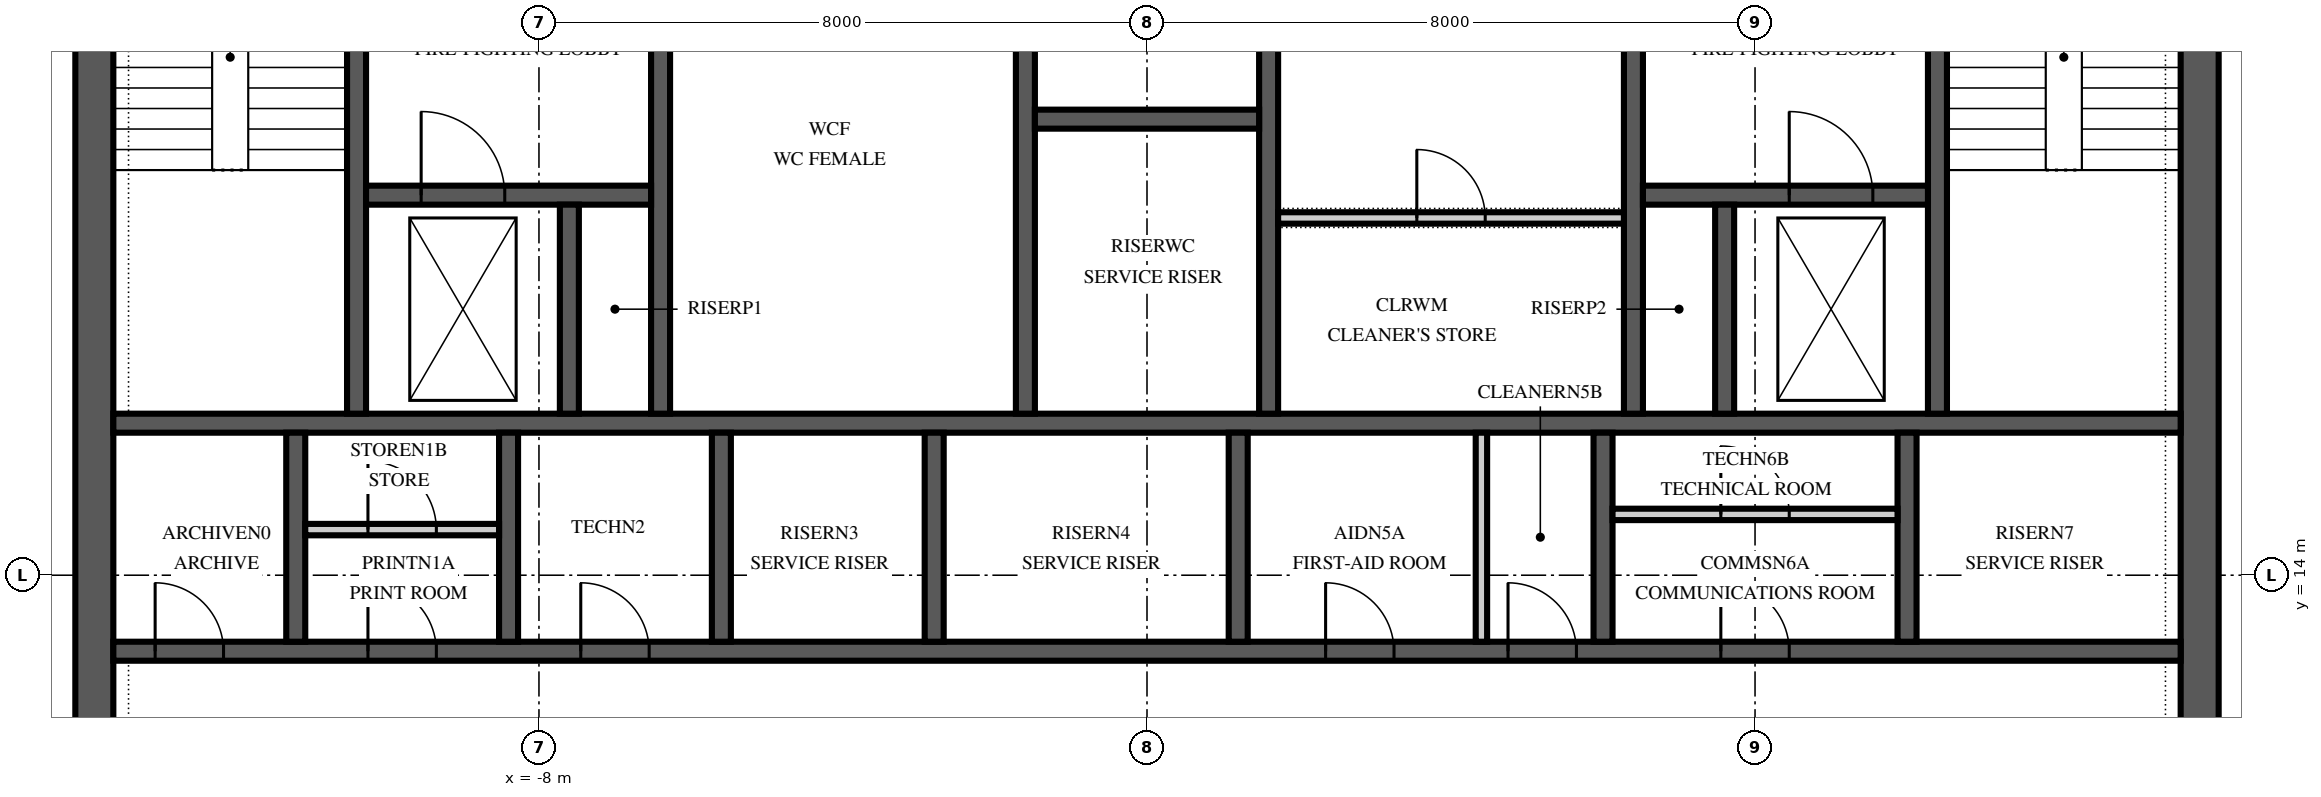
"""IFC4 building model, lengths in metres.
Left out: names, types, materials, properties, quantities, classifications, styles, units other than length and angle.
Written with IfcOpenShell. Run it as: python <this file> out.ifc"""

import sys

from ifc_helpers import new_model, si_unit, direction, frame, frame_2d, origin, place, context, subcontext, project, spatial, polyline, rectangle, outline, extrude, element, fill, save


model = new_model("IFC4")
c1 = context("Model", 3, precision=1e-05, world=origin(), true_north=direction((0.0, 1.0)))
c2 = subcontext(c1, "Body", "Model", "MODEL_VIEW")
j1 = project(units=[si_unit("LENGTHUNIT", "METRE"), si_unit("PLANEANGLEUNIT", "RADIAN")], contexts=[c1])
p1 = place(None, origin())
s1 = spatial("IfcSite", under=j1, at=p1, CompositionType="ELEMENT")
p2 = place(p1, origin())
s2 = spatial("IfcBuilding", under=s1, at=p2, CompositionType="ELEMENT")
p3 = place(p2, frame((0.0, 0.0, 312.0)))
s3 = spatial("IfcBuildingStorey", under=s2, at=p3, CompositionType="ELEMENT", Elevation=312.0)
p4 = place(p3, frame((13.85, 6.15, 0.0), z_axis=(0.0, 0.0, 1.0), x_axis=(0.0, 1.0, 0.0)))
e1 = element("IfcWall", 1, at=p4, inside=s3, PredefinedType="SHEAR", context=c2, shape_type="SweptSolid", body=[
    extrude(outline(polyline([(0.0, -0.25), (17.7, -0.25), (17.7, 0.0), (17.45, 0.0), (17.45, 0.25), (0.25, 0.25), (0.25, 0.0), (0.0, 0.0), (0.0, -0.25)])), origin(), (0.0, 0.0, 1.0), 4.0),
])
p5 = place(p4, frame((4.15, 0.0, 0.0)))
e2 = element("IfcOpeningElement", 2, at=p5, cuts=e1, PredefinedType="OPENING", context=c2, shape_type="SweptSolid", body=[
    extrude(rectangle(XDim=1.8, YDim=2.4, at=frame_2d((0.9, 1.2))), frame((0.0, 0.265, 0.0), z_axis=(0.0, -1.0, 0.0), x_axis=(1.0, 0.0, 0.0)), (0.0, 0.0, 1.0), 0.53),
])
p6 = place(p3, frame((-13.85, 23.85, 0.0), z_axis=(0.0, 0.0, 1.0), x_axis=(0.0, -1.0, 0.0)))
e3 = element("IfcWall", 3, at=p6, inside=s3, PredefinedType="SHEAR", context=c2, shape_type="SweptSolid", body=[
    extrude(outline(polyline([(0.0, -0.25), (17.7, -0.25), (17.7, 0.0), (17.45, 0.0), (17.45, 0.25), (0.25, 0.25), (0.25, 0.0), (0.0, 0.0), (0.0, -0.25)])), origin(), (0.0, 0.0, 1.0), 4.0),
])
p7 = place(p6, frame((11.75, 0.0, 0.0)))
e4 = element("IfcOpeningElement", 4, at=p7, cuts=e3, PredefinedType="OPENING", context=c2, shape_type="SweptSolid", body=[
    extrude(rectangle(XDim=1.8, YDim=2.4, at=frame_2d((0.9, 1.2))), frame((0.0, 0.265, 0.0), z_axis=(0.0, -1.0, 0.0), x_axis=(1.0, 0.0, 0.0)), (0.0, 0.0, 1.0), 0.53),
])
p8 = place(p3, frame((-13.6, 13.0, 0.0), z_axis=(0.0, 0.0, 1.0), x_axis=(1.0, 0.0, 0.0)))
e5 = element("IfcWall", 5, at=p8, inside=s3, PredefinedType="SHEAR", context=c2, shape_type="SweptSolid", body=[
    extrude(rectangle(XDim=27.2, YDim=0.25, at=frame_2d((13.6, 0.0))), origin(), (0.0, 0.0, 1.0), 4.0),
])
p9 = place(p8, frame((15.95, 0.0, 0.0)))
e6 = element("IfcOpeningElement", 6, at=p9, cuts=e5, PredefinedType="OPENING", context=c2, shape_type="SweptSolid", body=[
    extrude(rectangle(XDim=0.9, YDim=2.1, at=frame_2d((0.45, 1.05))), frame((0.0, 0.14, 0.0), z_axis=(0.0, -1.0, 0.0), x_axis=(1.0, 0.0, 0.0)), (0.0, 0.0, 1.0), 0.28),
])
p10 = place(p8, frame((18.35, 0.0, 0.0)))
e7 = element("IfcOpeningElement", 7, at=p10, cuts=e5, PredefinedType="OPENING", context=c2, shape_type="SweptSolid", body=[
    extrude(rectangle(XDim=0.9, YDim=2.1, at=frame_2d((0.45, 1.05))), frame((0.0, 0.14, 0.0), z_axis=(0.0, -1.0, 0.0), x_axis=(1.0, 0.0, 0.0)), (0.0, 0.0, 1.0), 0.28),
])
p11 = place(p8, frame((21.15, 0.0, 0.0)))
e8 = element("IfcOpeningElement", 8, at=p11, cuts=e5, PredefinedType="OPENING", context=c2, shape_type="SweptSolid", body=[
    extrude(rectangle(XDim=0.9, YDim=2.1, at=frame_2d((0.45, 1.05))), frame((0.0, 0.14, 0.0), z_axis=(0.0, -1.0, 0.0), x_axis=(1.0, 0.0, 0.0)), (0.0, 0.0, 1.0), 0.28),
])
p12 = place(p8, frame((0.55, 0.0, 0.0)))
e9 = element("IfcOpeningElement", 9, at=p12, cuts=e5, PredefinedType="OPENING", context=c2, shape_type="SweptSolid", body=[
    extrude(rectangle(XDim=0.9, YDim=2.1, at=frame_2d((0.45, 1.05))), frame((0.0, 0.14, 0.0), z_axis=(0.0, -1.0, 0.0), x_axis=(1.0, 0.0, 0.0)), (0.0, 0.0, 1.0), 0.28),
])
p13 = place(p8, frame((3.35, 0.0, 0.0)))
e10 = element("IfcOpeningElement", 10, at=p13, cuts=e5, PredefinedType="OPENING", context=c2, shape_type="SweptSolid", body=[
    extrude(rectangle(XDim=0.9, YDim=2.1, at=frame_2d((0.45, 1.05))), frame((0.0, 0.14, 0.0), z_axis=(0.0, -1.0, 0.0), x_axis=(1.0, 0.0, 0.0)), (0.0, 0.0, 1.0), 0.28),
])
p14 = place(p8, frame((6.15, 0.0, 0.0)))
e11 = element("IfcOpeningElement", 11, at=p14, cuts=e5, PredefinedType="OPENING", context=c2, shape_type="SweptSolid", body=[
    extrude(rectangle(XDim=0.9, YDim=2.1, at=frame_2d((0.45, 1.05))), frame((0.0, 0.14, 0.0), z_axis=(0.0, -1.0, 0.0), x_axis=(1.0, 0.0, 0.0)), (0.0, 0.0, 1.0), 0.28),
])
p15 = place(p3, frame((-13.6, 16.0, 0.0), z_axis=(0.0, 0.0, 1.0), x_axis=(1.0, 0.0, 0.0)))
e12 = element("IfcWall", 12, at=p15, inside=s3, PredefinedType="SHEAR", context=c2, shape_type="SweptSolid", body=[
    extrude(rectangle(XDim=27.2, YDim=0.25, at=frame_2d((13.6, 0.0))), origin(), (0.0, 0.0, 1.0), 4.0),
])
for number, where, z_axis, x_axis in (
    (13, (-11.2, 13.125, 0.0), (0.0, 0.0, 1.0), (0.0, 1.0, 0.0)),
    (14, (-8.4, 13.125, 0.0), (0.0, 0.0, 1.0), (0.0, 1.0, 0.0)),
    (15, (-5.6, 13.125, 0.0), (0.0, 0.0, 1.0), (0.0, 1.0, 0.0)),
    (16, (-2.8, 13.125, 0.0), (0.0, 0.0, 1.0), (0.0, 1.0, 0.0)),
    (17, (1.2, 13.125, 0.0), (0.0, 0.0, 1.0), (0.0, 1.0, 0.0)),
    (18, (6.0, 13.125, 0.0), (0.0, 0.0, 1.0), (0.0, 1.0, 0.0)),
    (19, (10.0, 13.125, 0.0), (0.0, 0.0, 1.0), (0.0, 1.0, 0.0)),
):
    element("IfcWall", number, at=place(p3, frame(where, z_axis=z_axis, x_axis=x_axis)), inside=s3, PredefinedType="SHEAR", context=c2, shape_type="SweptSolid", body=[
        extrude(rectangle(XDim=2.75, YDim=0.25, at=frame_2d((1.375, 0.0))), origin(), (0.0, 0.0, 1.0), 4.0),
    ])
p16 = place(p3, frame((-10.4, 16.125, 0.0), z_axis=(0.0, 0.0, 1.0), x_axis=(0.0, 1.0, 0.0)))
e20 = element("IfcWall", 20, at=p16, inside=s3, PredefinedType="SHEAR", context=c2, shape_type="SweptSolid", body=[
    extrude(rectangle(XDim=7.475, YDim=0.25, at=frame_2d((3.738, 0.0))), origin(), (0.0, 0.0, 1.0), 4.0),
])
p17 = place(p16, frame((6.275, 0.0, 0.0)))
e21 = element("IfcOpeningElement", 21, at=p17, cuts=e20, PredefinedType="OPENING", context=c2, shape_type="SweptSolid", body=[
    extrude(rectangle(XDim=1.0, YDim=2.1, at=frame_2d((0.5, 1.05))), frame((0.0, 0.14, 0.0), z_axis=(0.0, -1.0, 0.0), x_axis=(1.0, 0.0, 0.0)), (0.0, 0.0, 1.0), 0.28),
])
for number, where, z_axis, x_axis in (
    (22, (-6.4, 16.125, 0.0), (0.0, 0.0, 1.0), (0.0, 1.0, 0.0)),
    (23, (-1.6, 16.125, 0.0), (0.0, 0.0, 1.0), (0.0, 1.0, 0.0)),
    (24, (1.6, 16.125, 0.0), (0.0, 0.0, 1.0), (0.0, 1.0, 0.0)),
    (25, (6.4, 16.125, 0.0), (0.0, 0.0, 1.0), (0.0, 1.0, 0.0)),
):
    element("IfcWall", number, at=place(p3, frame(where, z_axis=z_axis, x_axis=x_axis)), inside=s3, PredefinedType="SHEAR", context=c2, shape_type="SweptSolid", body=[
        extrude(rectangle(XDim=7.475, YDim=0.25, at=frame_2d((3.738, 0.0))), origin(), (0.0, 0.0, 1.0), 4.0),
    ])
p18 = place(p3, frame((10.4, 16.125, 0.0), z_axis=(0.0, 0.0, 1.0), x_axis=(0.0, 1.0, 0.0)))
e26 = element("IfcWall", 26, at=p18, inside=s3, PredefinedType="SHEAR", context=c2, shape_type="SweptSolid", body=[
    extrude(rectangle(XDim=7.475, YDim=0.25, at=frame_2d((3.738, 0.0))), origin(), (0.0, 0.0, 1.0), 4.0),
])
p19 = place(p18, frame((6.275, 0.0, 0.0)))
e27 = element("IfcOpeningElement", 27, at=p19, cuts=e26, PredefinedType="OPENING", context=c2, shape_type="SweptSolid", body=[
    extrude(rectangle(XDim=1.0, YDim=2.1, at=frame_2d((0.5, 1.05))), frame((0.0, 0.14, 0.0), z_axis=(0.0, -1.0, 0.0), x_axis=(1.0, 0.0, 0.0)), (0.0, 0.0, 1.0), 0.28),
])
p20 = place(p3, frame((-10.275, 19.0, 0.0), z_axis=(0.0, 0.0, 1.0), x_axis=(1.0, 0.0, 0.0)))
e28 = element("IfcWall", 28, at=p20, inside=s3, PredefinedType="SHEAR", context=c2, shape_type="SweptSolid", body=[
    extrude(rectangle(XDim=3.75, YDim=0.25, at=frame_2d((1.875, 0.0))), origin(), (0.0, 0.0, 1.0), 4.0),
])
p21 = place(p20, frame((0.725, 0.0, 0.0)))
e29 = element("IfcOpeningElement", 29, at=p21, cuts=e28, PredefinedType="OPENING", context=c2, shape_type="SweptSolid", body=[
    extrude(rectangle(XDim=1.1, YDim=2.1, at=frame_2d((0.55, 1.05))), frame((0.0, 0.14, 0.0), z_axis=(0.0, -1.0, 0.0), x_axis=(1.0, 0.0, 0.0)), (0.0, 0.0, 1.0), 0.28),
])
p22 = place(p3, frame((6.525, 19.0, 0.0), z_axis=(0.0, 0.0, 1.0), x_axis=(1.0, 0.0, 0.0)))
e30 = element("IfcWall", 30, at=p22, inside=s3, PredefinedType="SHEAR", context=c2, shape_type="SweptSolid", body=[
    extrude(rectangle(XDim=3.75, YDim=0.25, at=frame_2d((1.875, 0.0))), origin(), (0.0, 0.0, 1.0), 4.0),
])
p23 = place(p22, frame((1.925, 0.0, 0.0)))
e31 = element("IfcOpeningElement", 31, at=p23, cuts=e30, PredefinedType="OPENING", context=c2, shape_type="SweptSolid", body=[
    extrude(rectangle(XDim=1.1, YDim=2.1, at=frame_2d((0.55, 1.05))), frame((0.0, 0.14, 0.0), z_axis=(0.0, -1.0, 0.0), x_axis=(1.0, 0.0, 0.0)), (0.0, 0.0, 1.0), 0.28),
])
for number, where, z_axis, x_axis in (
    (32, (-7.6, 16.125, 0.0), (0.0, 0.0, 1.0), (0.0, 1.0, 0.0)),
    (33, (7.6, 16.125, 0.0), (0.0, 0.0, 1.0), (0.0, 1.0, 0.0)),
):
    element("IfcWall", number, at=place(p3, frame(where, z_axis=z_axis, x_axis=x_axis)), inside=s3, PredefinedType="SHEAR", context=c2, shape_type="SweptSolid", body=[
        extrude(rectangle(XDim=2.75, YDim=0.25, at=frame_2d((1.375, 0.0))), origin(), (0.0, 0.0, 1.0), 4.0),
    ])
p24 = place(p3, frame((-1.475, 20.0, 0.0), z_axis=(0.0, 0.0, 1.0), x_axis=(1.0, 0.0, 0.0)))
e34 = element("IfcWall", 34, at=p24, inside=s3, PredefinedType="SHEAR", context=c2, shape_type="SweptSolid", body=[
    extrude(rectangle(XDim=2.95, YDim=0.25, at=frame_2d((1.475, 0.0))), origin(), (0.0, 0.0, 1.0), 4.0),
])
p25 = place(p3, frame((1.725, 18.7, 0.0), z_axis=(0.0, 0.0, 1.0), x_axis=(1.0, 0.0, 0.0)))
e35 = element("IfcWall", 35, at=p25, inside=s3, PredefinedType="PARTITIONING", context=c2, shape_type="SweptSolid", body=[
    extrude(rectangle(XDim=4.55, YDim=0.15, at=frame_2d((2.275, 0.0))), origin(), (0.0, 0.0, 1.0), 3.85),
])
p26 = place(p25, frame((1.825, 0.0, 0.0)))
e36 = element("IfcOpeningElement", 36, at=p26, cuts=e35, PredefinedType="OPENING", context=c2, shape_type="SweptSolid", body=[
    extrude(rectangle(XDim=0.9, YDim=2.1, at=frame_2d((0.45, 1.05))), frame((0.0, 0.09, 0.0), z_axis=(0.0, -1.0, 0.0), x_axis=(1.0, 0.0, 0.0)), (0.0, 0.0, 1.0), 0.18),
])
p27 = place(p3, frame((4.4, 13.125, 0.0), z_axis=(0.0, 0.0, 1.0), x_axis=(0.0, 1.0, 0.0)))
e37 = element("IfcWall", 37, at=p27, inside=s3, PredefinedType="PARTITIONING", context=c2, shape_type="SweptSolid", body=[
    extrude(rectangle(XDim=2.75, YDim=0.15, at=frame_2d((1.375, 0.0))), origin(), (0.0, 0.0, 1.0), 3.85),
])
p28 = place(p3, frame((6.125, 14.8, 0.0), z_axis=(0.0, 0.0, 1.0), x_axis=(1.0, 0.0, 0.0)))
e38 = element("IfcWall", 38, at=p28, inside=s3, PredefinedType="PARTITIONING", context=c2, shape_type="SweptSolid", body=[
    extrude(rectangle(XDim=3.75, YDim=0.15, at=frame_2d((1.875, 0.0))), origin(), (0.0, 0.0, 1.0), 3.85),
])
p29 = place(p28, frame((1.425, 0.0, 0.0)))
e39 = element("IfcOpeningElement", 39, at=p29, cuts=e38, PredefinedType="OPENING", context=c2, shape_type="SweptSolid", body=[
    extrude(rectangle(XDim=0.9, YDim=2.1, at=frame_2d((0.45, 1.05))), frame((0.0, 0.09, 0.0), z_axis=(0.0, -1.0, 0.0), x_axis=(1.0, 0.0, 0.0)), (0.0, 0.0, 1.0), 0.18),
])
p30 = place(p3, frame((-11.075, 14.6, 0.0), z_axis=(0.0, 0.0, 1.0), x_axis=(1.0, 0.0, 0.0)))
e40 = element("IfcWall", 40, at=p30, inside=s3, PredefinedType="PARTITIONING", context=c2, shape_type="SweptSolid", body=[
    extrude(rectangle(XDim=2.55, YDim=0.15, at=frame_2d((1.275, 0.0))), origin(), (0.0, 0.0, 1.0), 3.85),
])
p31 = place(p30, frame((0.825, 0.0, 0.0)))
e41 = element("IfcOpeningElement", 41, at=p31, cuts=e40, PredefinedType="OPENING", context=c2, shape_type="SweptSolid", body=[
    extrude(rectangle(XDim=0.9, YDim=2.1, at=frame_2d((0.45, 1.05))), frame((0.0, 0.09, 0.0), z_axis=(0.0, -1.0, 0.0), x_axis=(1.0, 0.0, 0.0)), (0.0, 0.0, 1.0), 0.18),
])
p32 = place(p23, origin())
e42 = element("IfcDoor", 42, at=p32, inside=s3, OperationType="SLIDING_TO_RIGHT", PredefinedType="DOOR", context=c2, shape_type="SweptSolid", body=[
    extrude(rectangle(XDim=1.1, YDim=2.1, at=frame_2d((0.55, 1.05))), frame((0.0, 0.125, 0.0), z_axis=(0.0, -1.0, 0.0), x_axis=(1.0, 0.0, 0.0)), (0.0, 0.0, 1.0), 0.25),
])
fill(e31, e42)
p33 = place(p21, origin())
e43 = element("IfcDoor", 43, at=p33, inside=s3, OperationType="SLIDING_TO_RIGHT", PredefinedType="DOOR", context=c2, shape_type="SweptSolid", body=[
    extrude(rectangle(XDim=1.1, YDim=2.1, at=frame_2d((0.55, 1.05))), frame((0.0, 0.125, 0.0), z_axis=(0.0, -1.0, 0.0), x_axis=(1.0, 0.0, 0.0)), (0.0, 0.0, 1.0), 0.25),
])
fill(e29, e43)
p34 = place(p9, origin())
e44 = element("IfcDoor", 44, at=p34, inside=s3, OperationType="SINGLE_SWING_LEFT", PredefinedType="DOOR", context=c2, shape_type="SweptSolid", body=[
    extrude(rectangle(XDim=0.9, YDim=2.1, at=frame_2d((0.45, 1.05))), frame((0.0, 0.125, 0.0), z_axis=(0.0, -1.0, 0.0), x_axis=(1.0, 0.0, 0.0)), (0.0, 0.0, 1.0), 0.25),
])
fill(e6, e44)
p35 = place(p10, origin())
e45 = element("IfcDoor", 45, at=p35, inside=s3, OperationType="SINGLE_SWING_LEFT", PredefinedType="DOOR", context=c2, shape_type="SweptSolid", body=[
    extrude(rectangle(XDim=0.9, YDim=2.1, at=frame_2d((0.45, 1.05))), frame((0.0, 0.125, 0.0), z_axis=(0.0, -1.0, 0.0), x_axis=(1.0, 0.0, 0.0)), (0.0, 0.0, 1.0), 0.25),
])
fill(e7, e45)
p36 = place(p11, origin())
e46 = element("IfcDoor", 46, at=p36, inside=s3, OperationType="SINGLE_SWING_LEFT", PredefinedType="DOOR", context=c2, shape_type="SweptSolid", body=[
    extrude(rectangle(XDim=0.9, YDim=2.1, at=frame_2d((0.45, 1.05))), frame((0.0, 0.125, 0.0), z_axis=(0.0, -1.0, 0.0), x_axis=(1.0, 0.0, 0.0)), (0.0, 0.0, 1.0), 0.25),
])
fill(e8, e46)
p37 = place(p29, origin())
e47 = element("IfcDoor", 47, at=p37, inside=s3, OperationType="SINGLE_SWING_LEFT", PredefinedType="DOOR", context=c2, shape_type="SweptSolid", body=[
    extrude(rectangle(XDim=0.9, YDim=2.1, at=frame_2d((0.45, 1.05))), frame((0.0, 0.075, 0.0), z_axis=(0.0, -1.0, 0.0), x_axis=(1.0, 0.0, 0.0)), (0.0, 0.0, 1.0), 0.149),
])
fill(e39, e47)
p38 = place(p12, origin())
e48 = element("IfcDoor", 48, at=p38, inside=s3, OperationType="SINGLE_SWING_LEFT", PredefinedType="DOOR", context=c2, shape_type="SweptSolid", body=[
    extrude(rectangle(XDim=0.9, YDim=2.1, at=frame_2d((0.45, 1.05))), frame((0.0, 0.125, 0.0), z_axis=(0.0, -1.0, 0.0), x_axis=(1.0, 0.0, 0.0)), (0.0, 0.0, 1.0), 0.25),
])
fill(e9, e48)
p39 = place(p13, origin())
e49 = element("IfcDoor", 49, at=p39, inside=s3, OperationType="SINGLE_SWING_LEFT", PredefinedType="DOOR", context=c2, shape_type="SweptSolid", body=[
    extrude(rectangle(XDim=0.9, YDim=2.1, at=frame_2d((0.45, 1.05))), frame((0.0, 0.125, 0.0), z_axis=(0.0, -1.0, 0.0), x_axis=(1.0, 0.0, 0.0)), (0.0, 0.0, 1.0), 0.25),
])
fill(e10, e49)
p40 = place(p31, origin())
e50 = element("IfcDoor", 50, at=p40, inside=s3, OperationType="SINGLE_SWING_LEFT", PredefinedType="DOOR", context=c2, shape_type="SweptSolid", body=[
    extrude(rectangle(XDim=0.9, YDim=2.1, at=frame_2d((0.45, 1.05))), frame((0.0, 0.075, 0.0), z_axis=(0.0, -1.0, 0.0), x_axis=(1.0, 0.0, 0.0)), (0.0, 0.0, 1.0), 0.149),
])
fill(e41, e50)
p41 = place(p14, origin())
e51 = element("IfcDoor", 51, at=p41, inside=s3, OperationType="SINGLE_SWING_LEFT", PredefinedType="DOOR", context=c2, shape_type="SweptSolid", body=[
    extrude(rectangle(XDim=0.9, YDim=2.1, at=frame_2d((0.45, 1.05))), frame((0.0, 0.125, 0.0), z_axis=(0.0, -1.0, 0.0), x_axis=(1.0, 0.0, 0.0)), (0.0, 0.0, 1.0), 0.25),
])
fill(e11, e51)
p42 = place(p26, origin())
e52 = element("IfcDoor", 52, at=p42, inside=s3, OperationType="SINGLE_SWING_LEFT", PredefinedType="DOOR", context=c2, shape_type="SweptSolid", body=[
    extrude(rectangle(XDim=0.9, YDim=2.1, at=frame_2d((0.45, 1.05))), frame((0.0, 0.075, 0.0), z_axis=(0.0, -1.0, 0.0), x_axis=(1.0, 0.0, 0.0)), (0.0, 0.0, 1.0), 0.149),
])
fill(e36, e52)
save(model, sys.argv[1])
